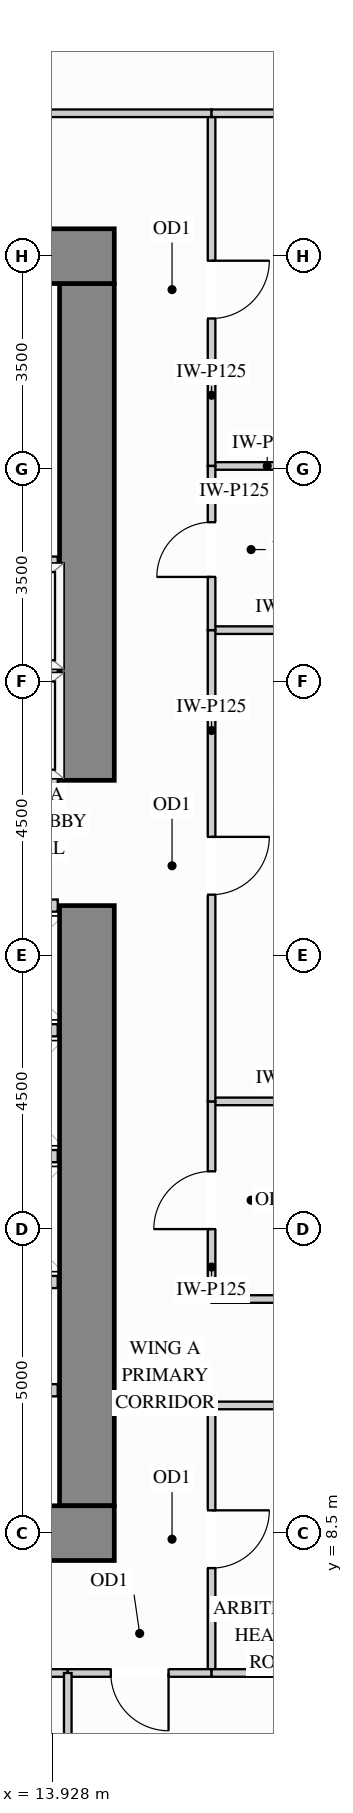
"""IFC4 building model, lengths in metres.
Left out: names, types, materials, properties, quantities, classifications, styles, units other than length and angle.
Written with IfcOpenShell. Run it as: python <this file> out.ifc"""

import sys

from ifc_helpers import new_model, si_unit, direction, frame, frame_2d, origin, place, context, subcontext, project, spatial, rectangle, extrude, source, transform, mapped, element, fill, save


model = new_model("IFC4")
c1 = context("Model", 3, precision=1e-05, world=origin(), true_north=direction((0.0, 1.0)))
c2 = subcontext(c1, "Body", "Model", "MODEL_VIEW")
j1 = project(units=[si_unit("LENGTHUNIT", "METRE"), si_unit("PLANEANGLEUNIT", "RADIAN")], contexts=[c1])
p1 = place(None, origin())
s1 = spatial("IfcSite", under=j1, at=p1, CompositionType="ELEMENT")
p2 = place(p1, origin())
s2 = spatial("IfcBuilding", under=s1, at=p2, CompositionType="ELEMENT")
p3 = place(p2, frame((0.0, 0.0, 29.7)))
s3 = spatial("IfcBuildingStorey", under=s2, at=p3, CompositionType="ELEMENT", Elevation=29.7)
m1 = source(origin(), c2, "Body", "SweptSolid", [
    extrude(rectangle(XDim=9.87, YDim=0.9, at=frame_2d((4.935, 0.0))), origin(), (0.0, 0.0, 1.0), 3.38),
])
p4 = place(p3, frame((14.5, 8.95, 0.0), z_axis=(0.0, 0.0, 1.0), x_axis=(0.0, 1.0, 0.0)))
e1 = element("IfcWall", 1, at=p4, inside=s3, PredefinedType="SHEAR", context=c2, shape_type="MappedRepresentation", body=[
    mapped(m1, transform((0.0, 0.0, 0.0), x_axis=(1.0, 0.0, 0.0), y_axis=(0.0, 1.0, 0.0), z_axis=(0.0, 0.0, 1.0))),
])
m2 = source(origin(), c2, "Body", "SweptSolid", [
    extrude(rectangle(XDim=8.17, YDim=0.9, at=frame_2d((4.085, 0.0))), origin(), (0.0, 0.0, 1.0), 3.38),
])
p5 = place(p3, frame((14.5, 20.88, 0.0), z_axis=(0.0, 0.0, 1.0), x_axis=(0.0, 1.0, 0.0)))
e2 = element("IfcWall", 2, at=p5, inside=s3, PredefinedType="SHEAR", context=c2, shape_type="MappedRepresentation", body=[
    mapped(m2, transform((0.0, 0.0, 0.0), x_axis=(1.0, 0.0, 0.0), y_axis=(0.0, 1.0, 0.0), z_axis=(0.0, 0.0, 1.0))),
])
m3 = source(origin(), c2, "Body", "SweptSolid", [
    extrude(rectangle(XDim=10.9, YDim=0.9, at=frame_2d((5.45, 0.0))), origin(), (0.0, 0.0, 1.0), 3.38),
])
for number, where, z_axis, x_axis in (
    (3, (4.05, 29.5, 0.0), (0.0, 0.0, 1.0), (1.0, 0.0, 0.0)),
    (4, (4.05, 8.5, 0.0), (0.0, 0.0, 1.0), (1.0, 0.0, 0.0)),
):
    element("IfcWall", number, at=place(p3, frame(where, z_axis=z_axis, x_axis=x_axis)), inside=s3, PredefinedType="SHEAR", context=c2, shape_type="MappedRepresentation", body=[
        mapped(m3, transform((0.0, 0.0, 0.0), x_axis=(1.0, 0.0, 0.0), y_axis=(0.0, 1.0, 0.0), z_axis=(0.0, 0.0, 1.0))),
    ])
m4 = source(origin(), c2, "Body", "SweptSolid", [
    extrude(rectangle(XDim=2.6, YDim=0.125, at=frame_2d((1.3, 0.0))), origin(), (0.0, 0.0, 1.0), 3.365),
])
p6 = place(p3, frame((16.55, 15.6, 0.0), z_axis=(0.0, 0.0, 1.0), x_axis=(1.0, 0.0, 0.0)))
e5 = element("IfcWall", 5, at=p6, inside=s3, PredefinedType="PARTITIONING", context=c2, shape_type="MappedRepresentation", body=[
    mapped(m4, transform((0.0, 0.0, 0.0), x_axis=(1.0, 0.0, 0.0), y_axis=(0.0, 1.0, 0.0), z_axis=(0.0, 0.0, 1.0))),
])
m5 = source(origin(), c2, "Body", "SweptSolid", [
    extrude(rectangle(XDim=2.598, YDim=0.125, at=frame_2d((1.299, 0.0))), origin(), (0.0, 0.0, 1.0), 3.365),
])
for number, where, z_axis, x_axis in (
    (6, (16.55, 23.35, 0.0), (0.0, 0.0, 1.0), (1.0, 0.0, 0.0)),
    (7, (16.55, 26.05, 0.0), (0.0, 0.0, 1.0), (1.0, 0.0, 0.0)),
):
    element("IfcWall", number, at=place(p3, frame(where, z_axis=z_axis, x_axis=x_axis)), inside=s3, PredefinedType="PARTITIONING", context=c2, shape_type="MappedRepresentation", body=[
        mapped(m5, transform((0.0, 0.0, 0.0), x_axis=(1.0, 0.0, 0.0), y_axis=(0.0, 1.0, 0.0), z_axis=(0.0, 0.0, 1.0))),
    ])
p7 = place(p3, frame((16.55, 12.35, 0.0), z_axis=(0.0, 0.0, 1.0), x_axis=(0.0, 1.0, 0.0)))
e8 = element("IfcWall", 8, at=p7, inside=s3, PredefinedType="PARTITIONING", context=c2, shape_type="SweptSolid", body=[
    extrude(rectangle(XDim=3.25, YDim=0.125, at=frame_2d((1.625, 0.0))), origin(), (0.0, 0.0, 1.0), 3.365),
])
p8 = place(p7, frame((1.15, 0.0, 0.0)))
e9 = element("IfcOpeningElement", 9, at=p8, cuts=e8, PredefinedType="OPENING", context=c2, shape_type="SweptSolid", body=[
    extrude(rectangle(XDim=0.95, YDim=2.15, at=frame_2d((0.475, 1.075))), frame((0.0, 0.073, 0.0), z_axis=(0.0, -1.0, 0.0), x_axis=(1.0, 0.0, 0.0)), (0.0, 0.0, 1.0), 0.145),
])
p9 = place(p3, frame((16.55, 15.6, 0.0), z_axis=(0.0, 0.0, 1.0), x_axis=(0.0, 1.0, 0.0)))
e10 = element("IfcWall", 10, at=p9, inside=s3, PredefinedType="PARTITIONING", context=c2, shape_type="SweptSolid", body=[
    extrude(rectangle(XDim=7.75, YDim=0.125, at=frame_2d((3.875, 0.0))), origin(), (0.0, 0.0, 1.0), 3.365),
])
p10 = place(p9, frame((3.4, 0.0, 0.0)))
e11 = element("IfcOpeningElement", 11, at=p10, cuts=e10, PredefinedType="OPENING", context=c2, shape_type="SweptSolid", body=[
    extrude(rectangle(XDim=0.95, YDim=2.15, at=frame_2d((0.475, 1.075))), frame((0.0, 0.073, 0.0), z_axis=(0.0, -1.0, 0.0), x_axis=(1.0, 0.0, 0.0)), (0.0, 0.0, 1.0), 0.145),
])
p11 = place(p3, frame((16.55, 26.05, 0.0), z_axis=(0.0, 0.0, 1.0), x_axis=(0.0, 1.0, 0.0)))
e12 = element("IfcWall", 12, at=p11, inside=s3, PredefinedType="PARTITIONING", context=c2, shape_type="SweptSolid", body=[
    extrude(rectangle(XDim=5.8, YDim=0.125, at=frame_2d((2.9, 0.0))), origin(), (0.0, 0.0, 1.0), 3.365),
])
p12 = place(p11, frame((2.425, 0.0, 0.0)))
e13 = element("IfcOpeningElement", 13, at=p12, cuts=e12, PredefinedType="OPENING", context=c2, shape_type="SweptSolid", body=[
    extrude(rectangle(XDim=0.95, YDim=2.15, at=frame_2d((0.475, 1.075))), frame((0.0, 0.073, 0.0), z_axis=(0.0, -1.0, 0.0), x_axis=(1.0, 0.0, 0.0)), (0.0, 0.0, 1.0), 0.145),
])
p13 = place(p3, frame((16.55, 6.2, 0.0), z_axis=(0.0, 0.0, 1.0), x_axis=(0.0, 1.0, 0.0)))
e14 = element("IfcWall", 14, at=p13, inside=s3, PredefinedType="PARTITIONING", context=c2, shape_type="SweptSolid", body=[
    extrude(rectangle(XDim=4.4, YDim=0.125, at=frame_2d((2.2, 0.0))), origin(), (0.0, 0.0, 1.0), 3.365),
])
p14 = place(p13, frame((1.725, 0.0, 0.0)))
e15 = element("IfcOpeningElement", 15, at=p14, cuts=e14, PredefinedType="OPENING", context=c2, shape_type="SweptSolid", body=[
    extrude(rectangle(XDim=0.95, YDim=2.15, at=frame_2d((0.475, 1.075))), frame((0.0, 0.073, 0.0), z_axis=(0.0, -1.0, 0.0), x_axis=(1.0, 0.0, 0.0)), (0.0, 0.0, 1.0), 0.145),
])
p15 = place(p3, frame((16.55, 23.35, 0.0), z_axis=(0.0, 0.0, 1.0), x_axis=(0.0, 1.0, 0.0)))
e16 = element("IfcWall", 16, at=p15, inside=s3, PredefinedType="PARTITIONING", context=c2, shape_type="SweptSolid", body=[
    extrude(rectangle(XDim=2.7, YDim=0.125, at=frame_2d((1.35, 0.0))), origin(), (0.0, 0.0, 1.0), 3.365),
])
p16 = place(p15, frame((0.875, 0.0, 0.0)))
e17 = element("IfcOpeningElement", 17, at=p16, cuts=e16, PredefinedType="OPENING", context=c2, shape_type="SweptSolid", body=[
    extrude(rectangle(XDim=0.9, YDim=2.15, at=frame_2d((0.45, 1.075))), frame((0.0, 0.073, 0.0), z_axis=(0.0, -1.0, 0.0), x_axis=(1.0, 0.0, 0.0)), (0.0, 0.0, 1.0), 0.145),
])
p17 = place(p3, frame((2.45, 31.85, 0.0), z_axis=(0.0, 0.0, 1.0), x_axis=(1.0, 0.0, 0.0)))
e18 = element("IfcWall", 18, at=p17, inside=s3, PredefinedType="PARTITIONING", context=c2, shape_type="SweptSolid", body=[
    extrude(rectangle(XDim=14.1, YDim=0.125, at=frame_2d((7.05, 0.0))), origin(), (0.0, 0.0, 1.0), 2.828),
])
p18 = place(p17, frame((6.575, 0.0, 0.0)))
e19 = element("IfcOpeningElement", 19, at=p18, cuts=e18, PredefinedType="OPENING", context=c2, shape_type="SweptSolid", body=[
    extrude(rectangle(XDim=0.95, YDim=2.15, at=frame_2d((0.475, 1.075))), frame((0.0, 0.073, 0.0), z_axis=(0.0, -1.0, 0.0), x_axis=(1.0, 0.0, 0.0)), (0.0, 0.0, 1.0), 0.145),
])
m6 = source(origin(), c2, "Body", "SweptSolid", [
    extrude(rectangle(XDim=2.598, YDim=0.125, at=frame_2d((1.299, 0.0))), origin(), (0.0, 0.0, 1.0), 2.828),
])
p19 = place(p3, frame((16.55, 31.85, 0.0), z_axis=(0.0, 0.0, 1.0), x_axis=(1.0, 0.0, 0.0)))
e20 = element("IfcWall", 20, at=p19, inside=s3, PredefinedType="PARTITIONING", context=c2, shape_type="MappedRepresentation", body=[
    mapped(m6, transform((0.0, 0.0, 0.0), x_axis=(1.0, 0.0, 0.0), y_axis=(0.0, 1.0, 0.0), z_axis=(0.0, 0.0, 1.0))),
])
m7 = source(origin(), c2, "Body", "SweptSolid", [
    extrude(rectangle(XDim=2.95, YDim=0.125, at=frame_2d((1.475, 0.0))), origin(), (0.0, 0.0, 1.0), 3.365),
])
for number, where, z_axis, x_axis in (
    (21, (16.55, 12.35, 0.0), (0.0, 0.0, 1.0), (1.0, 0.0, 0.0)),
    (22, (16.55, 10.6, 0.0), (0.0, 0.0, 1.0), (1.0, 0.0, 0.0)),
):
    element("IfcWall", number, at=place(p3, frame(where, z_axis=z_axis, x_axis=x_axis)), inside=s3, PredefinedType="PARTITIONING", context=c2, shape_type="MappedRepresentation", body=[
        mapped(m7, transform((0.0, 0.0, 0.0), x_axis=(1.0, 0.0, 0.0), y_axis=(0.0, 1.0, 0.0), z_axis=(0.0, 0.0, 1.0))),
    ])
p20 = place(p3, frame((10.544, 6.2, 0.0), z_axis=(0.0, 0.0, 1.0), x_axis=(1.0, 0.0, 0.0)))
e23 = element("IfcWall", 23, at=p20, inside=s3, PredefinedType="PARTITIONING", context=c2, shape_type="SweptSolid", body=[
    extrude(rectangle(XDim=3.641, YDim=0.125, at=frame_2d((1.821, 0.0))), origin(), (0.0, 0.0, 1.0), 2.828),
])
p21 = place(p20, frame((1.345, 0.0, 0.0)))
e24 = element("IfcOpeningElement", 24, at=p21, cuts=e23, PredefinedType="OPENING", context=c2, shape_type="SweptSolid", body=[
    extrude(rectangle(XDim=0.95, YDim=2.15, at=frame_2d((0.475, 1.075))), frame((0.0, 0.073, 0.0), z_axis=(0.0, -1.0, 0.0), x_axis=(1.0, 0.0, 0.0)), (0.0, 0.0, 1.0), 0.145),
])
p22 = place(p3, frame((14.185, 6.2, 0.0), z_axis=(0.0, 0.0, 1.0), x_axis=(1.0, 0.0, 0.0)))
e25 = element("IfcWall", 25, at=p22, inside=s3, PredefinedType="PARTITIONING", context=c2, shape_type="SweptSolid", body=[
    extrude(rectangle(XDim=2.365, YDim=0.125, at=frame_2d((1.183, 0.0))), origin(), (0.0, 0.0, 1.0), 2.828),
])
p23 = place(p22, frame((0.708, 0.0, 0.0)))
e26 = element("IfcOpeningElement", 26, at=p23, cuts=e25, PredefinedType="OPENING", context=c2, shape_type="SweptSolid", body=[
    extrude(rectangle(XDim=0.95, YDim=2.15, at=frame_2d((0.475, 1.075))), frame((0.0, 0.073, 0.0), z_axis=(0.0, -1.0, 0.0), x_axis=(1.0, 0.0, 0.0)), (0.0, 0.0, 1.0), 0.145),
])
p24 = place(p3, frame((16.55, 6.2, 0.0), z_axis=(0.0, 0.0, 1.0), x_axis=(1.0, 0.0, 0.0)))
e27 = element("IfcWall", 27, at=p24, inside=s3, PredefinedType="PARTITIONING", context=c2, shape_type="MappedRepresentation", body=[
    mapped(m6, transform((0.0, 0.0, 0.0), x_axis=(1.0, 0.0, 0.0), y_axis=(0.0, 1.0, 0.0), z_axis=(0.0, 0.0, 1.0))),
])
m8 = source(origin(), c2, "Body", "SweptSolid", [
    extrude(rectangle(XDim=4.94, YDim=0.125, at=frame_2d((2.47, 0.0))), origin(), (0.0, 0.0, 1.0), 3.365),
])
p25 = place(p3, frame((14.185, 1.26, 0.0), z_axis=(0.0, 0.0, 1.0), x_axis=(0.0, 1.0, 0.0)))
e28 = element("IfcWall", 28, at=p25, inside=s3, PredefinedType="PARTITIONING", context=c2, shape_type="MappedRepresentation", body=[
    mapped(m8, transform((0.0, 0.0, 0.0), x_axis=(1.0, 0.0, 0.0), y_axis=(0.0, 1.0, 0.0), z_axis=(0.0, 0.0, 1.0))),
])
m9 = source(origin(), c2, "Body", "SweptSolid", [
    extrude(rectangle(XDim=1.6, YDim=0.2, at=frame_2d((0.8, 0.0))), origin(), (0.0, 0.0, 1.0), 3.365),
])
p26 = place(p3, frame((12.42, 10.85, 0.0), z_axis=(0.0, 0.0, 1.0), x_axis=(1.0, 0.0, 0.0)))
e29 = element("IfcWall", 29, at=p26, inside=s3, PredefinedType="PARTITIONING", context=c2, shape_type="MappedRepresentation", body=[
    mapped(m9, transform((0.0, 0.0, 0.0), x_axis=(1.0, 0.0, 0.0), y_axis=(0.0, 1.0, 0.0), z_axis=(0.0, 0.0, 1.0))),
])
m10 = source(origin(), c2, "Body", "SweptSolid", [
    extrude(rectangle(XDim=2.19, YDim=0.2, at=frame_2d((1.095, 0.0))), origin(), (0.0, 0.0, 1.0), 3.365),
])
for number, where, z_axis, x_axis in (
    (30, (11.83, 22.66, 0.0), (0.0, 0.0, 1.0), (1.0, 0.0, 0.0)),
    (31, (11.83, 20.9, 0.0), (0.0, 0.0, 1.0), (1.0, 0.0, 0.0)),
    (32, (11.83, 24.46, 0.0), (0.0, 0.0, 1.0), (1.0, 0.0, 0.0)),
):
    element("IfcWall", number, at=place(p3, frame(where, z_axis=z_axis, x_axis=x_axis)), inside=s3, PredefinedType="PARTITIONING", context=c2, shape_type="MappedRepresentation", body=[
        mapped(m10, transform((0.0, 0.0, 0.0), x_axis=(1.0, 0.0, 0.0), y_axis=(0.0, 1.0, 0.0), z_axis=(0.0, 0.0, 1.0))),
    ])
m11 = source(origin(), c2, "Body", "SweptSolid", [
    extrude(rectangle(XDim=1.79, YDim=0.2, at=frame_2d((0.895, 0.0))), origin(), (0.0, 0.0, 1.0), 3.365),
])
for number, where, z_axis, x_axis in (
    (33, (12.23, 14.7, 0.0), (0.0, 0.0, 1.0), (1.0, 0.0, 0.0)),
    (34, (12.23, 12.63, 0.0), (0.0, 0.0, 1.0), (1.0, 0.0, 0.0)),
    (35, (12.23, 16.77, 0.0), (0.0, 0.0, 1.0), (1.0, 0.0, 0.0)),
    (36, (12.23, 18.82, 0.0), (0.0, 0.0, 1.0), (1.0, 0.0, 0.0)),
):
    element("IfcWall", number, at=place(p3, frame(where, z_axis=z_axis, x_axis=x_axis)), inside=s3, PredefinedType="PARTITIONING", context=c2, shape_type="MappedRepresentation", body=[
        mapped(m11, transform((0.0, 0.0, 0.0), x_axis=(1.0, 0.0, 0.0), y_axis=(0.0, 1.0, 0.0), z_axis=(0.0, 0.0, 1.0))),
    ])
m12 = source(origin(), c2, "Body", "SweptSolid", [
    extrude(rectangle(XDim=0.95, YDim=2.15, at=frame_2d((0.475, 1.075))), frame((0.0, 0.025, 0.0), z_axis=(0.0, -1.0, 0.0), x_axis=(1.0, 0.0, 0.0)), (0.0, 0.0, 1.0), 0.05),
])
p27 = place(p14, origin())
e37 = element("IfcDoor", 37, at=p27, inside=s3, OperationType="SINGLE_SWING_RIGHT", PredefinedType="DOOR", context=c2, shape_type="MappedRepresentation", body=[
    mapped(m12, transform((0.0, 0.0, 0.0), x_axis=(1.0, 0.0, 0.0), y_axis=(0.0, 1.0, 0.0), z_axis=(0.0, 0.0, 1.0))),
])
fill(e15, e37)
p28 = place(p8, origin())
e38 = element("IfcDoor", 38, at=p28, inside=s3, OperationType="SINGLE_SWING_LEFT", PredefinedType="DOOR", context=c2, shape_type="MappedRepresentation", body=[
    mapped(m12, transform((0.0, 0.0, 0.0), x_axis=(1.0, 0.0, 0.0), y_axis=(0.0, 1.0, 0.0), z_axis=(0.0, 0.0, 1.0))),
])
fill(e9, e38)
p29 = place(p10, origin())
e39 = element("IfcDoor", 39, at=p29, inside=s3, OperationType="SINGLE_SWING_RIGHT", PredefinedType="DOOR", context=c2, shape_type="MappedRepresentation", body=[
    mapped(m12, transform((0.0, 0.0, 0.0), x_axis=(1.0, 0.0, 0.0), y_axis=(0.0, 1.0, 0.0), z_axis=(0.0, 0.0, 1.0))),
])
fill(e11, e39)
p30 = place(p12, origin())
e40 = element("IfcDoor", 40, at=p30, inside=s3, OperationType="SINGLE_SWING_RIGHT", PredefinedType="DOOR", context=c2, shape_type="MappedRepresentation", body=[
    mapped(m12, transform((0.0, 0.0, 0.0), x_axis=(1.0, 0.0, 0.0), y_axis=(0.0, 1.0, 0.0), z_axis=(0.0, 0.0, 1.0))),
])
fill(e13, e40)
p31 = place(p23, origin())
e41 = element("IfcDoor", 41, at=p31, inside=s3, OperationType="SINGLE_SWING_RIGHT", PredefinedType="DOOR", context=c2, shape_type="MappedRepresentation", body=[
    mapped(m12, transform((0.0, 0.0, 0.0), x_axis=(1.0, 0.0, 0.0), y_axis=(0.0, 1.0, 0.0), z_axis=(0.0, 0.0, 1.0))),
])
fill(e26, e41)
m13 = source(origin(), c2, "Body", "SweptSolid", [
    extrude(rectangle(XDim=0.9, YDim=2.15, at=frame_2d((0.45, 1.075))), frame((0.0, 0.025, 0.0), z_axis=(0.0, -1.0, 0.0), x_axis=(1.0, 0.0, 0.0)), (0.0, 0.0, 1.0), 0.05),
])
p32 = place(p16, origin())
e42 = element("IfcDoor", 42, at=p32, inside=s3, OperationType="SINGLE_SWING_LEFT", PredefinedType="DOOR", context=c2, shape_type="MappedRepresentation", body=[
    mapped(m13, transform((0.0, 0.0, 0.0), x_axis=(1.0, 0.0, 0.0), y_axis=(0.0, 1.0, 0.0), z_axis=(0.0, 0.0, 1.0))),
])
fill(e17, e42)
save(model, sys.argv[1])
